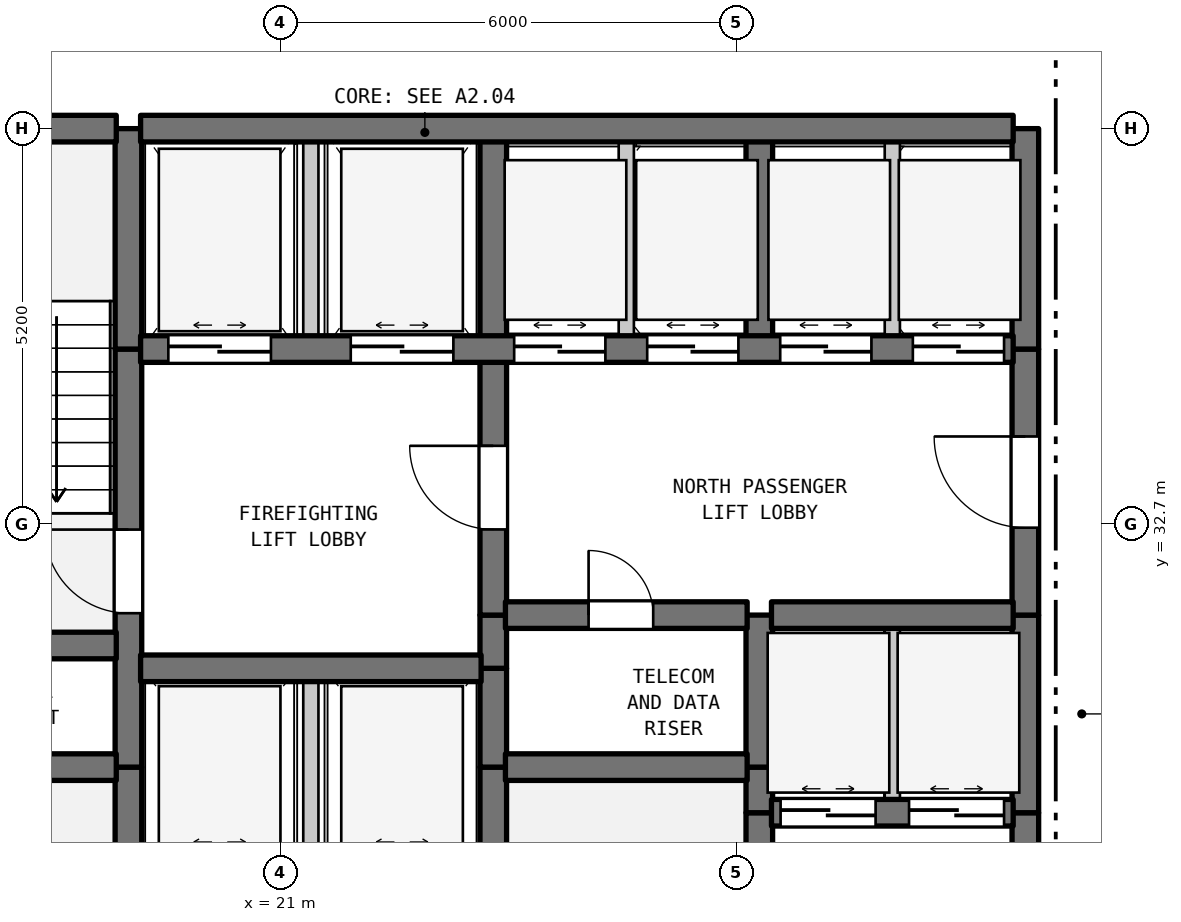
"""IFC4 building model, lengths in metres.
Left out: names, types, materials, properties, quantities, classifications, styles, units other than length and angle.
Written with IfcOpenShell. Run it as: python <this file> out.ifc"""

import sys

from ifc_helpers import new_model, si_unit, direction, frame, frame_2d, origin, place, context, subcontext, project, spatial, rectangle, extrude, element, fill, save


model = new_model("IFC4")
c1 = context("Model", 3, precision=1e-05, world=origin(), true_north=direction((0.0, 1.0)))
c2 = subcontext(c1, "Body", "Model", "MODEL_VIEW")
j1 = project(units=[si_unit("LENGTHUNIT", "METRE"), si_unit("PLANEANGLEUNIT", "RADIAN")], contexts=[c1])
p1 = place(None, origin())
s1 = spatial("IfcSite", under=j1, at=p1, CompositionType="ELEMENT")
p2 = place(p1, origin())
s2 = spatial("IfcBuilding", under=s1, at=p2, CompositionType="ELEMENT")
p3 = place(p2, frame((0.0, 0.0, 6.5)))
s3 = spatial("IfcBuildingStorey", under=s2, at=p3, CompositionType="ELEMENT", Elevation=6.5)
p4 = place(p3, frame((19.0, 28.2, 0.0), z_axis=(0.0, 0.0, 1.0), x_axis=(0.0, 1.0, 0.0)))
e1 = element("IfcWall", 1, at=p4, inside=s3, PredefinedType="SHEAR", context=c2, shape_type="SweptSolid", body=[
    extrude(rectangle(XDim=1.3, YDim=0.35, at=frame_2d((0.65, 0.0))), origin(), (0.0, 0.0, 1.0), 6.17),
])
p5 = place(p3, frame((19.0, 29.5, 0.0), z_axis=(0.0, 0.0, 1.0), x_axis=(0.0, 1.0, 0.0)))
e2 = element("IfcWall", 2, at=p5, inside=s3, PredefinedType="SHEAR", context=c2, shape_type="SweptSolid", body=[
    extrude(rectangle(XDim=5.5, YDim=0.35, at=frame_2d((2.75, 0.0))), origin(), (0.0, 0.0, 1.0), 6.17),
])
p6 = place(p5, frame((2.025, 0.0, 0.0)))
e3 = element("IfcOpeningElement", 3, at=p6, cuts=e2, PredefinedType="OPENING", context=c2, shape_type="SweptSolid", body=[
    extrude(rectangle(XDim=1.1, YDim=2.15, at=frame_2d((0.55, 1.075))), frame((0.0, 0.185, 0.0), z_axis=(0.0, -1.0, 0.0), x_axis=(1.0, 0.0, 0.0)), (0.0, 0.0, 1.0), 0.37),
])
p7 = place(p3, frame((19.0, 35.0, 0.0), z_axis=(0.0, 0.0, 1.0), x_axis=(0.0, 1.0, 0.0)))
e4 = element("IfcWall", 4, at=p7, inside=s3, PredefinedType="SHEAR", context=c2, shape_type="SweptSolid", body=[
    extrude(rectangle(XDim=2.9, YDim=0.35, at=frame_2d((1.45, 0.0))), origin(), (0.0, 0.0, 1.0), 6.17),
])
p8 = place(p3, frame((21.4, 28.2, 0.0), z_axis=(0.0, 0.0, 1.0), x_axis=(0.0, 1.0, 0.0)))
e5 = element("IfcWall", 5, at=p8, inside=s3, PredefinedType="STANDARD", context=c2, shape_type="SweptSolid", body=[
    extrude(rectangle(XDim=2.6, YDim=0.2, at=frame_2d((1.3, 0.0))), origin(), (0.0, 0.0, 1.0), 6.17),
])
p9 = place(p3, frame((21.4, 35.0, 0.0), z_axis=(0.0, 0.0, 1.0), x_axis=(0.0, 1.0, 0.0)))
e6 = element("IfcWall", 6, at=p9, inside=s3, PredefinedType="STANDARD", context=c2, shape_type="SweptSolid", body=[
    extrude(rectangle(XDim=2.9, YDim=0.2, at=frame_2d((1.45, 0.0))), origin(), (0.0, 0.0, 1.0), 6.17),
])
for number, where, z_axis, x_axis in (
    (7, (23.8, 28.2, 0.0), (0.0, 0.0, 1.0), (0.0, 1.0, 0.0)),
    (8, (23.8, 29.5, 0.0), (0.0, 0.0, 1.0), (0.0, 1.0, 0.0)),
):
    element("IfcWall", number, at=place(p3, frame(where, z_axis=z_axis, x_axis=x_axis)), inside=s3, PredefinedType="SHEAR", context=c2, shape_type="SweptSolid", body=[
        extrude(rectangle(XDim=1.3, YDim=0.35, at=frame_2d((0.65, 0.0))), origin(), (0.0, 0.0, 1.0), 6.17),
    ])
p10 = place(p3, frame((23.8, 30.8, 0.0), z_axis=(0.0, 0.0, 1.0), x_axis=(0.0, 1.0, 0.0)))
e9 = element("IfcWall", 9, at=p10, inside=s3, PredefinedType="SHEAR", context=c2, shape_type="SweptSolid", body=[
    extrude(rectangle(XDim=0.7, YDim=0.35, at=frame_2d((0.35, 0.0))), origin(), (0.0, 0.0, 1.0), 6.17),
])
p11 = place(p3, frame((23.8, 31.5, 0.0), z_axis=(0.0, 0.0, 1.0), x_axis=(0.0, 1.0, 0.0)))
e10 = element("IfcWall", 10, at=p11, inside=s3, PredefinedType="SHEAR", context=c2, shape_type="SweptSolid", body=[
    extrude(rectangle(XDim=3.5, YDim=0.35, at=frame_2d((1.75, 0.0))), origin(), (0.0, 0.0, 1.0), 6.17),
])
p12 = place(p11, frame((1.127, 0.0, 0.0)))
e11 = element("IfcOpeningElement", 11, at=p12, cuts=e10, PredefinedType="OPENING", context=c2, shape_type="SweptSolid", body=[
    extrude(rectangle(XDim=1.1, YDim=2.15, at=frame_2d((0.55, 1.075))), frame((0.0, 0.185, 0.0), z_axis=(0.0, -1.0, 0.0), x_axis=(1.0, 0.0, 0.0)), (0.0, 0.0, 1.0), 0.37),
])
p13 = place(p3, frame((23.8, 35.0, 0.0), z_axis=(0.0, 0.0, 1.0), x_axis=(0.0, 1.0, 0.0)))
e12 = element("IfcWall", 12, at=p13, inside=s3, PredefinedType="SHEAR", context=c2, shape_type="SweptSolid", body=[
    extrude(rectangle(XDim=2.9, YDim=0.35, at=frame_2d((1.45, 0.0))), origin(), (0.0, 0.0, 1.0), 6.17),
])
p14 = place(p3, frame((25.55, 35.0, 0.0), z_axis=(0.0, 0.0, 1.0), x_axis=(0.0, 1.0, 0.0)))
e13 = element("IfcWall", 13, at=p14, inside=s3, PredefinedType="STANDARD", context=c2, shape_type="SweptSolid", body=[
    extrude(rectangle(XDim=2.9, YDim=0.2, at=frame_2d((1.45, 0.0))), origin(), (0.0, 0.0, 1.0), 6.17),
])
p15 = place(p3, frame((27.3, 25.6, 0.0), z_axis=(0.0, 0.0, 1.0), x_axis=(0.0, 1.0, 0.0)))
e14 = element("IfcWall", 14, at=p15, inside=s3, PredefinedType="SHEAR", context=c2, shape_type="SweptSolid", body=[
    extrude(rectangle(XDim=3.3, YDim=0.35, at=frame_2d((1.65, 0.0))), origin(), (0.0, 0.0, 1.0), 6.17),
])
p16 = place(p3, frame((27.3, 28.9, 0.0), z_axis=(0.0, 0.0, 1.0), x_axis=(0.0, 1.0, 0.0)))
e15 = element("IfcWall", 15, at=p16, inside=s3, PredefinedType="SHEAR", context=c2, shape_type="SweptSolid", body=[
    extrude(rectangle(XDim=0.6, YDim=0.35, at=frame_2d((0.3, 0.0))), origin(), (0.0, 0.0, 1.0), 6.17),
])
p17 = place(p3, frame((27.3, 29.5, 0.0), z_axis=(0.0, 0.0, 1.0), x_axis=(0.0, 1.0, 0.0)))
e16 = element("IfcWall", 16, at=p17, inside=s3, PredefinedType="SHEAR", context=c2, shape_type="SweptSolid", body=[
    extrude(rectangle(XDim=2.0, YDim=0.35, at=frame_2d((1.0, 0.0))), origin(), (0.0, 0.0, 1.0), 6.17),
])
p18 = place(p3, frame((27.3, 35.0, 0.0), z_axis=(0.0, 0.0, 1.0), x_axis=(0.0, 1.0, 0.0)))
e17 = element("IfcWall", 17, at=p18, inside=s3, PredefinedType="SHEAR", context=c2, shape_type="SweptSolid", body=[
    extrude(rectangle(XDim=2.9, YDim=0.35, at=frame_2d((1.45, 0.0))), origin(), (0.0, 0.0, 1.0), 6.17),
])
p19 = place(p3, frame((29.05, 28.9, 0.0), z_axis=(0.0, 0.0, 1.0), x_axis=(0.0, 1.0, 0.0)))
e18 = element("IfcWall", 18, at=p19, inside=s3, PredefinedType="STANDARD", context=c2, shape_type="SweptSolid", body=[
    extrude(rectangle(XDim=2.6, YDim=0.2, at=frame_2d((1.3, 0.0))), origin(), (0.0, 0.0, 1.0), 6.17),
])
p20 = place(p3, frame((29.05, 35.0, 0.0), z_axis=(0.0, 0.0, 1.0), x_axis=(0.0, 1.0, 0.0)))
e19 = element("IfcWall", 19, at=p20, inside=s3, PredefinedType="STANDARD", context=c2, shape_type="SweptSolid", body=[
    extrude(rectangle(XDim=2.9, YDim=0.2, at=frame_2d((1.45, 0.0))), origin(), (0.0, 0.0, 1.0), 6.17),
])
p21 = place(p3, frame((30.8, 25.6, 0.0), z_axis=(0.0, 0.0, 1.0), x_axis=(0.0, 1.0, 0.0)))
e20 = element("IfcWall", 20, at=p21, inside=s3, PredefinedType="SHEAR", context=c2, shape_type="SweptSolid", body=[
    extrude(rectangle(XDim=3.3, YDim=0.35, at=frame_2d((1.65, 0.0))), origin(), (0.0, 0.0, 1.0), 6.17),
])
p22 = place(p21, frame((0.978, 0.0, 0.0)))
e21 = element("IfcOpeningElement", 21, at=p22, cuts=e20, PredefinedType="OPENING", context=c2, shape_type="SweptSolid", body=[
    extrude(rectangle(XDim=1.2, YDim=2.2, at=frame_2d((0.6, 1.1))), frame((0.0, 0.185, 0.0), z_axis=(0.0, -1.0, 0.0), x_axis=(1.0, 0.0, 0.0)), (0.0, 0.0, 1.0), 0.37),
])
p23 = place(p3, frame((30.8, 28.9, 0.0), z_axis=(0.0, 0.0, 1.0), x_axis=(0.0, 1.0, 0.0)))
e22 = element("IfcWall", 22, at=p23, inside=s3, PredefinedType="SHEAR", context=c2, shape_type="SweptSolid", body=[
    extrude(rectangle(XDim=2.6, YDim=0.35, at=frame_2d((1.3, 0.0))), origin(), (0.0, 0.0, 1.0), 6.17),
])
p24 = place(p3, frame((30.8, 31.5, 0.0), z_axis=(0.0, 0.0, 1.0), x_axis=(0.0, 1.0, 0.0)))
e23 = element("IfcWall", 23, at=p24, inside=s3, PredefinedType="SHEAR", context=c2, shape_type="SweptSolid", body=[
    extrude(rectangle(XDim=3.5, YDim=0.35, at=frame_2d((1.75, 0.0))), origin(), (0.0, 0.0, 1.0), 6.17),
])
p25 = place(p24, frame((1.15, 0.0, 0.0)))
e24 = element("IfcOpeningElement", 24, at=p25, cuts=e23, PredefinedType="OPENING", context=c2, shape_type="SweptSolid", body=[
    extrude(rectangle(XDim=1.2, YDim=2.2, at=frame_2d((0.6, 1.1))), frame((0.0, 0.185, 0.0), z_axis=(0.0, -1.0, 0.0), x_axis=(1.0, 0.0, 0.0)), (0.0, 0.0, 1.0), 0.37),
])
p26 = place(p3, frame((30.8, 35.0, 0.0), z_axis=(0.0, 0.0, 1.0), x_axis=(0.0, 1.0, 0.0)))
e25 = element("IfcWall", 25, at=p26, inside=s3, PredefinedType="SHEAR", context=c2, shape_type="SweptSolid", body=[
    extrude(rectangle(XDim=2.9, YDim=0.35, at=frame_2d((1.45, 0.0))), origin(), (0.0, 0.0, 1.0), 6.17),
])
p27 = place(p3, frame((27.46, 28.9, 0.0), z_axis=(0.0, 0.0, 1.0), x_axis=(1.0, 0.0, 0.0)))
e26 = element("IfcWall", 26, at=p27, inside=s3, PredefinedType="SHEAR", context=c2, shape_type="SweptSolid", body=[
    extrude(rectangle(XDim=3.18, YDim=0.35, at=frame_2d((1.59, 0.0))), origin(), (0.0, 0.0, 1.0), 6.17),
])
p28 = place(p27, frame((0.12, 0.0, 0.0)))
e27 = element("IfcOpeningElement", 27, at=p28, cuts=e26, PredefinedType="OPENING", context=c2, shape_type="SweptSolid", body=[
    extrude(rectangle(XDim=1.25, YDim=2.2, at=frame_2d((0.625, 1.1))), frame((0.0, 0.185, 0.0), z_axis=(0.0, -1.0, 0.0), x_axis=(1.0, 0.0, 0.0)), (0.0, 0.0, 1.0), 0.37),
])
p29 = place(p27, frame((1.81, 0.0, 0.0)))
e28 = element("IfcOpeningElement", 28, at=p29, cuts=e26, PredefinedType="OPENING", context=c2, shape_type="SweptSolid", body=[
    extrude(rectangle(XDim=1.25, YDim=2.2, at=frame_2d((0.625, 1.1))), frame((0.0, 0.185, 0.0), z_axis=(0.0, -1.0, 0.0), x_axis=(1.0, 0.0, 0.0)), (0.0, 0.0, 1.0), 0.37),
])
p30 = place(p3, frame((15.16, 29.5, 0.0), z_axis=(0.0, 0.0, 1.0), x_axis=(1.0, 0.0, 0.0)))
e29 = element("IfcWall", 29, at=p30, inside=s3, PredefinedType="SHEAR", context=c2, shape_type="SweptSolid", body=[
    extrude(rectangle(XDim=3.68, YDim=0.35, at=frame_2d((1.84, 0.0))), origin(), (0.0, 0.0, 1.0), 6.17),
])
p31 = place(p3, frame((23.96, 29.5, 0.0), z_axis=(0.0, 0.0, 1.0), x_axis=(1.0, 0.0, 0.0)))
e30 = element("IfcWall", 30, at=p31, inside=s3, PredefinedType="SHEAR", context=c2, shape_type="SweptSolid", body=[
    extrude(rectangle(XDim=3.18, YDim=0.35, at=frame_2d((1.59, 0.0))), origin(), (0.0, 0.0, 1.0), 6.17),
])
p32 = place(p3, frame((19.16, 30.8, 0.0), z_axis=(0.0, 0.0, 1.0), x_axis=(1.0, 0.0, 0.0)))
e31 = element("IfcWall", 31, at=p32, inside=s3, PredefinedType="SHEAR", context=c2, shape_type="SweptSolid", body=[
    extrude(rectangle(XDim=4.48, YDim=0.35, at=frame_2d((2.24, 0.0))), origin(), (0.0, 0.0, 1.0), 6.17),
])
p33 = place(p3, frame((15.16, 31.1, 0.0), z_axis=(0.0, 0.0, 1.0), x_axis=(1.0, 0.0, 0.0)))
e32 = element("IfcWall", 32, at=p33, inside=s3, PredefinedType="SHEAR", context=c2, shape_type="SweptSolid", body=[
    extrude(rectangle(XDim=3.68, YDim=0.35, at=frame_2d((1.84, 0.0))), origin(), (0.0, 0.0, 1.0), 6.17),
])
p34 = place(p3, frame((23.96, 31.5, 0.0), z_axis=(0.0, 0.0, 1.0), x_axis=(1.0, 0.0, 0.0)))
e33 = element("IfcWall", 33, at=p34, inside=s3, PredefinedType="SHEAR", context=c2, shape_type="SweptSolid", body=[
    extrude(rectangle(XDim=3.18, YDim=0.35, at=frame_2d((1.59, 0.0))), origin(), (0.0, 0.0, 1.0), 6.17),
])
p35 = place(p34, frame((1.094, 0.0, 0.0)))
e34 = element("IfcOpeningElement", 34, at=p35, cuts=e33, PredefinedType="OPENING", context=c2, shape_type="SweptSolid", body=[
    extrude(rectangle(XDim=0.85, YDim=2.1, at=frame_2d((0.425, 1.05))), frame((0.0, 0.185, 0.0), z_axis=(0.0, -1.0, 0.0), x_axis=(1.0, 0.0, 0.0)), (0.0, 0.0, 1.0), 0.37),
])
p36 = place(p3, frame((27.46, 31.5, 0.0), z_axis=(0.0, 0.0, 1.0), x_axis=(1.0, 0.0, 0.0)))
e35 = element("IfcWall", 35, at=p36, inside=s3, PredefinedType="SHEAR", context=c2, shape_type="SweptSolid", body=[
    extrude(rectangle(XDim=3.18, YDim=0.35, at=frame_2d((1.59, 0.0))), origin(), (0.0, 0.0, 1.0), 6.17),
])
p37 = place(p3, frame((19.16, 35.0, 0.0), z_axis=(0.0, 0.0, 1.0), x_axis=(1.0, 0.0, 0.0)))
e36 = element("IfcWall", 36, at=p37, inside=s3, PredefinedType="SHEAR", context=c2, shape_type="SweptSolid", body=[
    extrude(rectangle(XDim=11.48, YDim=0.35, at=frame_2d((5.74, 0.0))), origin(), (0.0, 0.0, 1.0), 6.17),
])
p38 = place(p37, frame((0.365, 0.0, 0.0)))
e37 = element("IfcOpeningElement", 37, at=p38, cuts=e36, PredefinedType="OPENING", context=c2, shape_type="SweptSolid", body=[
    extrude(rectangle(XDim=1.35, YDim=2.2, at=frame_2d((0.675, 1.1))), frame((0.0, 0.185, 0.0), z_axis=(0.0, -1.0, 0.0), x_axis=(1.0, 0.0, 0.0)), (0.0, 0.0, 1.0), 0.37),
])
p39 = place(p37, frame((2.765, 0.0, 0.0)))
e38 = element("IfcOpeningElement", 38, at=p39, cuts=e36, PredefinedType="OPENING", context=c2, shape_type="SweptSolid", body=[
    extrude(rectangle(XDim=1.35, YDim=2.2, at=frame_2d((0.675, 1.1))), frame((0.0, 0.185, 0.0), z_axis=(0.0, -1.0, 0.0), x_axis=(1.0, 0.0, 0.0)), (0.0, 0.0, 1.0), 0.37),
])
p40 = place(p37, frame((4.915, 0.0, 0.0)))
e39 = element("IfcOpeningElement", 39, at=p40, cuts=e36, PredefinedType="OPENING", context=c2, shape_type="SweptSolid", body=[
    extrude(rectangle(XDim=1.2, YDim=2.2, at=frame_2d((0.6, 1.1))), frame((0.0, 0.185, 0.0), z_axis=(0.0, -1.0, 0.0), x_axis=(1.0, 0.0, 0.0)), (0.0, 0.0, 1.0), 0.37),
])
p41 = place(p37, frame((6.665, 0.0, 0.0)))
e40 = element("IfcOpeningElement", 40, at=p41, cuts=e36, PredefinedType="OPENING", context=c2, shape_type="SweptSolid", body=[
    extrude(rectangle(XDim=1.2, YDim=2.2, at=frame_2d((0.6, 1.1))), frame((0.0, 0.185, 0.0), z_axis=(0.0, -1.0, 0.0), x_axis=(1.0, 0.0, 0.0)), (0.0, 0.0, 1.0), 0.37),
])
p42 = place(p37, frame((8.415, 0.0, 0.0)))
e41 = element("IfcOpeningElement", 41, at=p42, cuts=e36, PredefinedType="OPENING", context=c2, shape_type="SweptSolid", body=[
    extrude(rectangle(XDim=1.2, YDim=2.2, at=frame_2d((0.6, 1.1))), frame((0.0, 0.185, 0.0), z_axis=(0.0, -1.0, 0.0), x_axis=(1.0, 0.0, 0.0)), (0.0, 0.0, 1.0), 0.37),
])
p43 = place(p37, frame((10.16, 0.0, 0.0)))
e42 = element("IfcOpeningElement", 42, at=p43, cuts=e36, PredefinedType="OPENING", context=c2, shape_type="SweptSolid", body=[
    extrude(rectangle(XDim=1.2, YDim=2.2, at=frame_2d((0.6, 1.1))), frame((0.0, 0.185, 0.0), z_axis=(0.0, -1.0, 0.0), x_axis=(1.0, 0.0, 0.0)), (0.0, 0.0, 1.0), 0.37),
])
p44 = place(p3, frame((15.16, 37.9, 0.0), z_axis=(0.0, 0.0, 1.0), x_axis=(1.0, 0.0, 0.0)))
e43 = element("IfcWall", 43, at=p44, inside=s3, PredefinedType="SHEAR", context=c2, shape_type="SweptSolid", body=[
    extrude(rectangle(XDim=3.68, YDim=0.35, at=frame_2d((1.84, 0.0))), origin(), (0.0, 0.0, 1.0), 6.17),
])
p45 = place(p3, frame((19.16, 37.9, 0.0), z_axis=(0.0, 0.0, 1.0), x_axis=(1.0, 0.0, 0.0)))
e44 = element("IfcWall", 44, at=p45, inside=s3, PredefinedType="SHEAR", context=c2, shape_type="SweptSolid", body=[
    extrude(rectangle(XDim=11.48, YDim=0.35, at=frame_2d((5.74, 0.0))), origin(), (0.0, 0.0, 1.0), 6.17),
])
p46 = place(p6, origin())
e45 = element("IfcDoor", 45, at=p46, inside=s3, OperationType="SINGLE_SWING_RIGHT", PredefinedType="DOOR", context=c2, shape_type="SweptSolid", body=[
    extrude(rectangle(XDim=1.1, YDim=2.15, at=frame_2d((0.55, 1.075))), frame((0.0, 0.025, 0.0), z_axis=(0.0, -1.0, 0.0), x_axis=(1.0, 0.0, 0.0)), (0.0, 0.0, 1.0), 0.05),
])
fill(e3, e45)
p47 = place(p12, origin())
e46 = element("IfcDoor", 46, at=p47, inside=s3, OperationType="SINGLE_SWING_RIGHT", PredefinedType="DOOR", context=c2, shape_type="SweptSolid", body=[
    extrude(rectangle(XDim=1.1, YDim=2.15, at=frame_2d((0.55, 1.075))), frame((0.0, 0.025, 0.0), z_axis=(0.0, -1.0, 0.0), x_axis=(1.0, 0.0, 0.0)), (0.0, 0.0, 1.0), 0.05),
])
fill(e11, e46)
p48 = place(p25, origin())
e47 = element("IfcDoor", 47, at=p48, inside=s3, OperationType="SINGLE_SWING_RIGHT", PredefinedType="DOOR", context=c2, shape_type="SweptSolid", body=[
    extrude(rectangle(XDim=1.2, YDim=2.2, at=frame_2d((0.6, 1.1))), frame((0.0, 0.025, 0.0), z_axis=(0.0, -1.0, 0.0), x_axis=(1.0, 0.0, 0.0)), (0.0, 0.0, 1.0), 0.05),
])
fill(e24, e47)
p49 = place(p28, origin())
e48 = element("IfcDoor", 48, at=p49, inside=s3, OperationType="DOUBLE_DOOR_SLIDING", PredefinedType="DOOR", context=c2, shape_type="SweptSolid", body=[
    extrude(rectangle(XDim=1.25, YDim=2.2, at=frame_2d((0.625, 1.1))), frame((0.0, 0.025, 0.0), z_axis=(0.0, -1.0, 0.0), x_axis=(1.0, 0.0, 0.0)), (0.0, 0.0, 1.0), 0.05),
])
fill(e27, e48)
p50 = place(p29, origin())
e49 = element("IfcDoor", 49, at=p50, inside=s3, OperationType="DOUBLE_DOOR_SLIDING", PredefinedType="DOOR", context=c2, shape_type="SweptSolid", body=[
    extrude(rectangle(XDim=1.25, YDim=2.2, at=frame_2d((0.625, 1.1))), frame((0.0, 0.025, 0.0), z_axis=(0.0, -1.0, 0.0), x_axis=(1.0, 0.0, 0.0)), (0.0, 0.0, 1.0), 0.05),
])
fill(e28, e49)
p51 = place(p35, origin())
e50 = element("IfcDoor", 50, at=p51, inside=s3, OperationType="SINGLE_SWING_LEFT", PredefinedType="DOOR", context=c2, shape_type="SweptSolid", body=[
    extrude(rectangle(XDim=0.85, YDim=2.1, at=frame_2d((0.425, 1.05))), frame((0.0, 0.025, 0.0), z_axis=(0.0, -1.0, 0.0), x_axis=(1.0, 0.0, 0.0)), (0.0, 0.0, 1.0), 0.05),
])
fill(e34, e50)
p52 = place(p38, origin())
e51 = element("IfcDoor", 51, at=p52, inside=s3, OperationType="DOUBLE_DOOR_SLIDING", PredefinedType="DOOR", context=c2, shape_type="SweptSolid", body=[
    extrude(rectangle(XDim=1.35, YDim=2.2, at=frame_2d((0.675, 1.1))), frame((0.0, 0.025, 0.0), z_axis=(0.0, -1.0, 0.0), x_axis=(1.0, 0.0, 0.0)), (0.0, 0.0, 1.0), 0.05),
])
fill(e37, e51)
p53 = place(p39, origin())
e52 = element("IfcDoor", 52, at=p53, inside=s3, OperationType="DOUBLE_DOOR_SLIDING", PredefinedType="DOOR", context=c2, shape_type="SweptSolid", body=[
    extrude(rectangle(XDim=1.35, YDim=2.2, at=frame_2d((0.675, 1.1))), frame((0.0, 0.025, 0.0), z_axis=(0.0, -1.0, 0.0), x_axis=(1.0, 0.0, 0.0)), (0.0, 0.0, 1.0), 0.05),
])
fill(e38, e52)
p54 = place(p40, origin())
e53 = element("IfcDoor", 53, at=p54, inside=s3, OperationType="DOUBLE_DOOR_SLIDING", PredefinedType="DOOR", context=c2, shape_type="SweptSolid", body=[
    extrude(rectangle(XDim=1.2, YDim=2.2, at=frame_2d((0.6, 1.1))), frame((0.0, 0.025, 0.0), z_axis=(0.0, -1.0, 0.0), x_axis=(1.0, 0.0, 0.0)), (0.0, 0.0, 1.0), 0.05),
])
fill(e39, e53)
p55 = place(p41, origin())
e54 = element("IfcDoor", 54, at=p55, inside=s3, OperationType="DOUBLE_DOOR_SLIDING", PredefinedType="DOOR", context=c2, shape_type="SweptSolid", body=[
    extrude(rectangle(XDim=1.2, YDim=2.2, at=frame_2d((0.6, 1.1))), frame((0.0, 0.025, 0.0), z_axis=(0.0, -1.0, 0.0), x_axis=(1.0, 0.0, 0.0)), (0.0, 0.0, 1.0), 0.05),
])
fill(e40, e54)
p56 = place(p42, origin())
e55 = element("IfcDoor", 55, at=p56, inside=s3, OperationType="DOUBLE_DOOR_SLIDING", PredefinedType="DOOR", context=c2, shape_type="SweptSolid", body=[
    extrude(rectangle(XDim=1.2, YDim=2.2, at=frame_2d((0.6, 1.1))), frame((0.0, 0.025, 0.0), z_axis=(0.0, -1.0, 0.0), x_axis=(1.0, 0.0, 0.0)), (0.0, 0.0, 1.0), 0.05),
])
fill(e41, e55)
p57 = place(p43, origin())
e56 = element("IfcDoor", 56, at=p57, inside=s3, OperationType="DOUBLE_DOOR_SLIDING", PredefinedType="DOOR", context=c2, shape_type="SweptSolid", body=[
    extrude(rectangle(XDim=1.2, YDim=2.2, at=frame_2d((0.6, 1.1))), frame((0.0, 0.025, 0.0), z_axis=(0.0, -1.0, 0.0), x_axis=(1.0, 0.0, 0.0)), (0.0, 0.0, 1.0), 0.05),
])
fill(e42, e56)
save(model, sys.argv[1])
